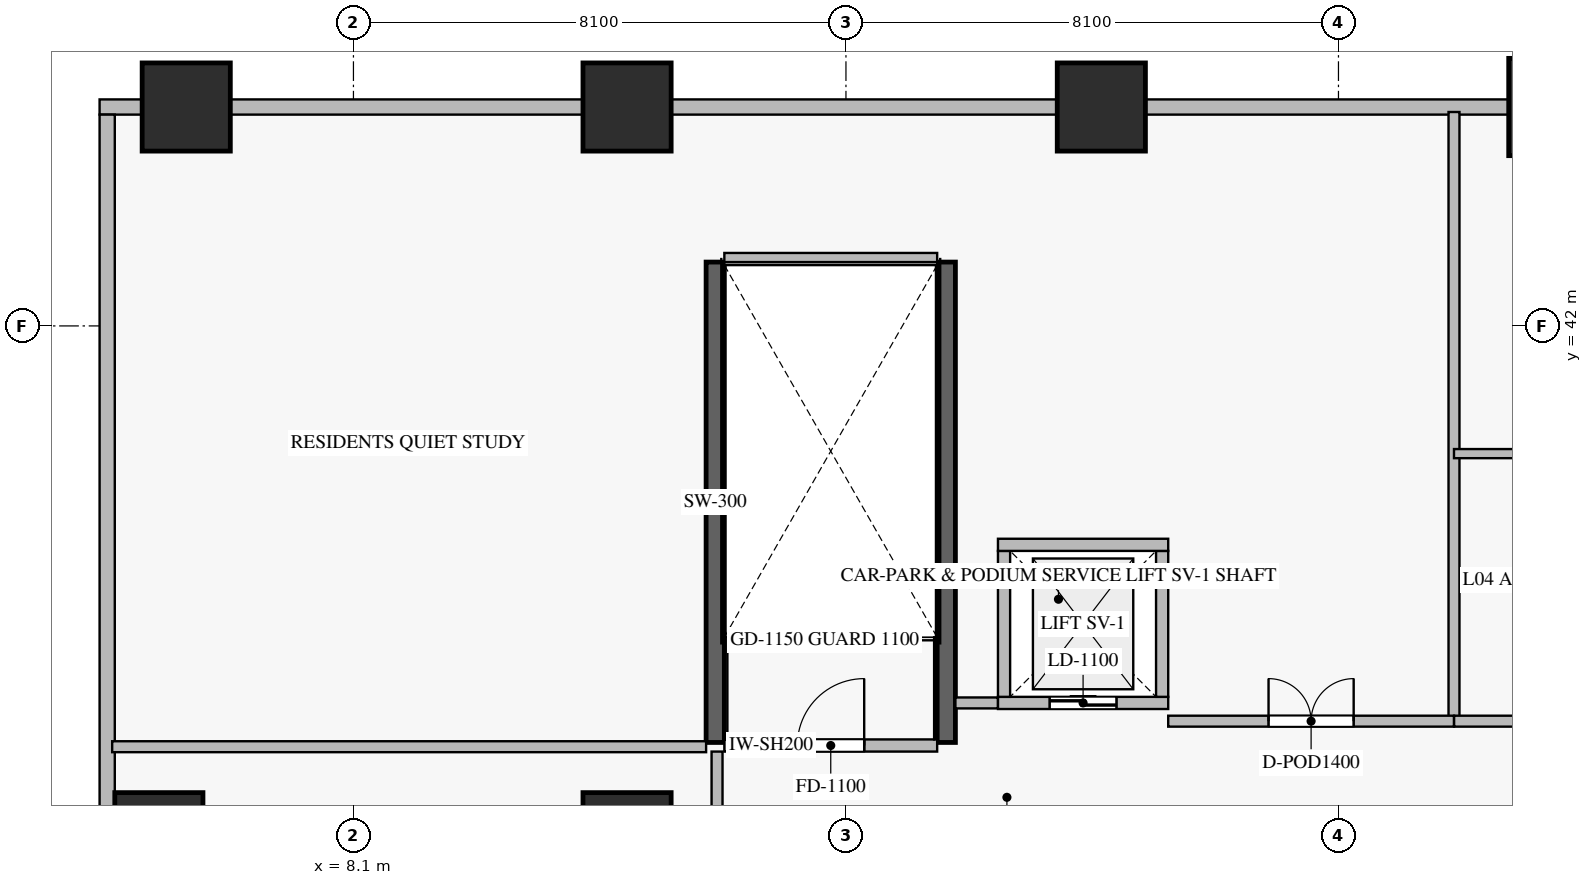
"""IFC4 building model, lengths in metres.
Left out: names, types, materials, properties, quantities, classifications, styles, units other than length and angle.
Written with IfcOpenShell. Run it as: python <this file> out.ifc"""

import sys

from ifc_helpers import new_model, si_unit, direction, frame, frame_2d, origin, origin_2d, place, context, subcontext, project, spatial, rectangle, extrude, source, transform, mapped, element, fill, save


model = new_model("IFC4")
c1 = context("Model", 3, precision=1e-05, world=origin(), true_north=direction((0.0, 1.0)))
c2 = subcontext(c1, "Body", "Model", "MODEL_VIEW")
j1 = project(units=[si_unit("LENGTHUNIT", "METRE"), si_unit("PLANEANGLEUNIT", "RADIAN")], contexts=[c1])
p1 = place(None, origin())
s1 = spatial("IfcSite", under=j1, at=p1, CompositionType="ELEMENT")
p2 = place(p1, origin())
s2 = spatial("IfcBuilding", under=s1, at=p2, CompositionType="ELEMENT")
p3 = place(p2, frame((0.0, 0.0, 21.0)))
s3 = spatial("IfcBuildingStorey", under=s2, at=p3, CompositionType="ELEMENT", Elevation=21.0)
m1 = source(origin(), c2, "Body", "SweptSolid", [
    extrude(rectangle(XDim=1.45, YDim=1.45, at=origin_2d()), origin(), (0.0, 0.0, 1.0), 6.11),
])
for number, where, z_axis, x_axis in (
    (1, (12.6, 45.6, -0.85), (0.0, 0.0, 1.0), (1.0, 0.0, 0.0)),
    (2, (20.4, 45.6, -0.85), (0.0, 0.0, 1.0), (1.0, 0.0, 0.0)),
):
    element("IfcColumn", number, at=place(p3, frame(where, z_axis=z_axis, x_axis=x_axis)), inside=s3, PredefinedType="COLUMN", context=c2, shape_type="MappedRepresentation", body=[
        mapped(m1, transform((0.0, 0.0, 0.0), scale=1.0)),
    ])
m2 = source(origin(), c2, "Body", "SweptSolid", [
    extrude(rectangle(XDim=1.6, YDim=1.6, at=origin_2d()), origin(), (0.0, 0.0, 1.0), 6.11),
])
p4 = place(p3, frame((27.9, 45.6, -0.85), z_axis=(0.0, 0.0, 1.0), x_axis=(1.0, 0.0, 0.0)))
e3 = element("IfcColumn", 3, at=p4, inside=s3, PredefinedType="COLUMN", context=c2, shape_type="MappedRepresentation", body=[
    mapped(m2, transform((0.0, 0.0, 0.0), scale=1.0)),
])
for number, where, z_axis, x_axis in (
    (4, (12.6, 33.6, -0.85), (0.0, 0.0, 1.0), (1.0, 0.0, 0.0)),
    (5, (4.9, 33.6, -0.85), (0.0, 0.0, 1.0), (1.0, 0.0, 0.0)),
    (6, (5.35, 45.6, -0.85), (0.0, 0.0, 1.0), (1.0, 0.0, 0.0)),
):
    element("IfcColumn", number, at=place(p3, frame(where, z_axis=z_axis, x_axis=x_axis)), inside=s3, PredefinedType="COLUMN", context=c2, shape_type="MappedRepresentation", body=[
        mapped(m1, transform((0.0, 0.0, 0.0), scale=1.0)),
    ])
p5 = place(p3, frame((60.875, 45.6, 0.0), z_axis=(0.0, 0.0, 1.0), x_axis=(-1.0, 0.0, 0.0)))
e7 = element("IfcWall", 7, at=p5, inside=s3, PredefinedType="ELEMENTEDWALL", context=c2, shape_type="SweptSolid", body=[
    extrude(rectangle(XDim=56.95, YDim=0.25, at=frame_2d((28.475, 0.0))), origin(), (0.0, 0.0, 1.0), 2.845),
])
p6 = place(p3, frame((4.05, 45.475, 0.0), z_axis=(0.0, 0.0, 1.0), x_axis=(0.0, -1.0, 0.0)))
e8 = element("IfcWall", 8, at=p6, inside=s3, PredefinedType="ELEMENTEDWALL", context=c2, shape_type="SweptSolid", body=[
    extrude(rectangle(XDim=40.55, YDim=0.25, at=frame_2d((20.275, 0.0))), origin(), (0.0, 0.0, 1.0), 5.245),
])
p7 = place(p6, frame((14.497, 0.0, 0.6)))
e9 = element("IfcOpeningElement", 9, at=p7, cuts=e8, PredefinedType="OPENING", context=c2, shape_type="SweptSolid", body=[
    extrude(rectangle(XDim=2.4, YDim=2.6, at=frame_2d((1.2, 1.3))), frame((0.0, 0.135, 0.0), z_axis=(0.0, -1.0, 0.0), x_axis=(1.0, 0.0, 0.0)), (0.0, 0.0, 1.0), 0.27),
])
p8 = place(p6, frame((23.653, 0.0, 0.6)))
e10 = element("IfcOpeningElement", 10, at=p8, cuts=e8, PredefinedType="OPENING", context=c2, shape_type="SweptSolid", body=[
    extrude(rectangle(XDim=2.4, YDim=2.6, at=frame_2d((1.2, 1.3))), frame((0.0, 0.135, 0.0), z_axis=(0.0, -1.0, 0.0), x_axis=(1.0, 0.0, 0.0)), (0.0, 0.0, 1.0), 0.27),
])
for number, where, z_axis, x_axis in (
    (11, (14.05, 35.15, -0.85), (0.0, 0.0, 1.0), (0.0, 1.0, 0.0)),
    (12, (17.85, 35.15, -0.85), (0.0, 0.0, 1.0), (0.0, 1.0, 0.0)),
):
    element("IfcWall", number, at=place(p3, frame(where, z_axis=z_axis, x_axis=x_axis)), inside=s3, PredefinedType="SHEAR", context=c2, shape_type="SweptSolid", body=[
        extrude(rectangle(XDim=7.9, YDim=0.3, at=frame_2d((3.95, 0.0))), origin(), (0.0, 0.0, 1.0), 6.108),
    ])
p9 = place(p3, frame((14.2, 35.1, 0.0), z_axis=(0.0, 0.0, 1.0), x_axis=(1.0, 0.0, 0.0)))
e13 = element("IfcWall", 13, at=p9, inside=s3, PredefinedType="STANDARD", context=c2, shape_type="SweptSolid", body=[
    extrude(rectangle(XDim=3.5, YDim=0.2, at=frame_2d((1.75, 0.0))), origin(), (0.0, 0.0, 1.0), 5.26),
])
p10 = place(p9, frame((1.2, 0.0, 0.0)))
e14 = element("IfcOpeningElement", 14, at=p10, cuts=e13, PredefinedType="OPENING", context=c2, shape_type="SweptSolid", body=[
    extrude(rectangle(XDim=1.1, YDim=2.15, at=frame_2d((0.55, 1.075))), frame((0.0, 0.11, 0.0), z_axis=(0.0, -1.0, 0.0), x_axis=(1.0, 0.0, 0.0)), (0.0, 0.0, 1.0), 0.22),
])
p11 = place(p3, frame((14.2, 43.1, 0.0), z_axis=(0.0, 0.0, 1.0), x_axis=(1.0, 0.0, 0.0)))
e15 = element("IfcWall", 15, at=p11, inside=s3, PredefinedType="STANDARD", context=c2, shape_type="SweptSolid", body=[
    extrude(rectangle(XDim=3.5, YDim=0.2, at=frame_2d((1.75, 0.0))), origin(), (0.0, 0.0, 1.0), 5.26),
])
p12 = place(p3, frame((18.7, 35.8, 0.0), z_axis=(0.0, 0.0, 1.0), x_axis=(1.0, 0.0, 0.0)))
e16 = element("IfcWall", 16, at=p12, inside=s3, PredefinedType="STANDARD", context=c2, shape_type="SweptSolid", body=[
    extrude(rectangle(XDim=2.8, YDim=0.2, at=frame_2d((1.4, 0.0))), origin(), (0.0, 0.0, 1.0), 5.26),
])
p13 = place(p12, frame((0.85, 0.0, 0.0)))
e17 = element("IfcOpeningElement", 17, at=p13, cuts=e16, PredefinedType="OPENING", context=c2, shape_type="SweptSolid", body=[
    extrude(rectangle(XDim=1.1, YDim=2.2, at=frame_2d((0.55, 1.1))), frame((0.0, 0.11, 0.0), z_axis=(0.0, -1.0, 0.0), x_axis=(1.0, 0.0, 0.0)), (0.0, 0.0, 1.0), 0.22),
])
for number, where, z_axis, x_axis in (
    (18, (18.8, 35.9, 0.0), (0.0, 0.0, 1.0), (0.0, 1.0, 0.0)),
    (19, (21.4, 35.9, 0.0), (0.0, 0.0, 1.0), (0.0, 1.0, 0.0)),
):
    element("IfcWall", number, at=place(p3, frame(where, z_axis=z_axis, x_axis=x_axis)), inside=s3, PredefinedType="STANDARD", context=c2, shape_type="SweptSolid", body=[
        extrude(rectangle(XDim=2.4, YDim=0.2, at=frame_2d((1.2, 0.0))), origin(), (0.0, 0.0, 1.0), 5.26),
    ])
p14 = place(p3, frame((18.7, 38.4, 0.0), z_axis=(0.0, 0.0, 1.0), x_axis=(1.0, 0.0, 0.0)))
e20 = element("IfcWall", 20, at=p14, inside=s3, PredefinedType="STANDARD", context=c2, shape_type="SweptSolid", body=[
    extrude(rectangle(XDim=2.8, YDim=0.2, at=frame_2d((1.4, 0.0))), origin(), (0.0, 0.0, 1.0), 5.26),
])
p15 = place(p3, frame((4.132, 35.08, 0.0), z_axis=(0.0, 0.0, 1.0), x_axis=(1.0, 0.0, 0.0)))
e21 = element("IfcWall", 21, at=p15, inside=s3, PredefinedType="PARTITIONING", context=c2, shape_type="SweptSolid", body=[
    extrude(rectangle(XDim=9.768, YDim=0.18, at=frame_2d((4.884, 0.0))), origin(), (0.0, 0.0, 1.0), 5.26),
])
p16 = place(p3, frame((18.0, 35.8, 0.0), z_axis=(0.0, 0.0, 1.0), x_axis=(1.0, 0.0, 0.0)))
e22 = element("IfcWall", 22, at=p16, inside=s3, PredefinedType="PARTITIONING", context=c2, shape_type="SweptSolid", body=[
    extrude(rectangle(XDim=0.698, YDim=0.18, at=frame_2d((0.349, 0.0))), origin(), (0.0, 0.0, 1.0), 5.26),
])
p17 = place(p3, frame((14.08, 33.08, 0.0), z_axis=(0.0, 0.0, 1.0), x_axis=(0.0, 1.0, 0.0)))
e23 = element("IfcWall", 23, at=p17, inside=s3, PredefinedType="PARTITIONING", context=c2, shape_type="SweptSolid", body=[
    extrude(rectangle(XDim=1.92, YDim=0.18, at=frame_2d((0.96, 0.0))), origin(), (0.0, 0.0, 1.0), 5.26),
])
p18 = place(p3, frame((26.2, 35.5, 0.0), z_axis=(0.0, 0.0, 1.0), x_axis=(0.0, 1.0, 0.0)))
e24 = element("IfcWall", 24, at=p18, inside=s3, PredefinedType="PARTITIONING", context=c2, shape_type="SweptSolid", body=[
    extrude(rectangle(XDim=10.018, YDim=0.18, at=frame_2d((5.009, 0.0))), origin(), (0.0, 0.0, 1.0), 5.26),
])
p19 = place(p3, frame((21.5, 35.5, 0.0), z_axis=(0.0, 0.0, 1.0), x_axis=(1.0, 0.0, 0.0)))
e25 = element("IfcWall", 25, at=p19, inside=s3, PredefinedType="PARTITIONING", context=c2, shape_type="SweptSolid", body=[
    extrude(rectangle(XDim=4.7, YDim=0.18, at=frame_2d((2.35, 0.0))), origin(), (0.0, 0.0, 1.0), 5.26),
])
p20 = place(p19, frame((1.65, 0.0, 0.0)))
e26 = element("IfcOpeningElement", 26, at=p20, cuts=e25, PredefinedType="OPENING", context=c2, shape_type="SweptSolid", body=[
    extrude(rectangle(XDim=1.4, YDim=2.25, at=frame_2d((0.7, 1.125))), frame((0.0, 0.1, 0.0), z_axis=(0.0, -1.0, 0.0), x_axis=(1.0, 0.0, 0.0)), (0.0, 0.0, 1.0), 0.2),
])
p21 = place(p3, frame((26.202, 35.5, 0.0), z_axis=(0.0, 0.0, 1.0), x_axis=(1.0, 0.0, 0.0)))
e27 = element("IfcWall", 27, at=p21, inside=s3, PredefinedType="PARTITIONING", context=c2, shape_type="SweptSolid", body=[
    extrude(rectangle(XDim=3.598, YDim=0.18, at=frame_2d((1.799, 0.0))), origin(), (0.0, 0.0, 1.0), 5.26),
])
p22 = place(p21, frame((1.299, 0.0, 0.0)))
e28 = element("IfcOpeningElement", 28, at=p22, cuts=e27, PredefinedType="OPENING", context=c2, shape_type="SweptSolid", body=[
    extrude(rectangle(XDim=1.0, YDim=2.15, at=frame_2d((0.5, 1.075))), frame((0.0, 0.1, 0.0), z_axis=(0.0, -1.0, 0.0), x_axis=(1.0, 0.0, 0.0)), (0.0, 0.0, 1.0), 0.2),
])
p23 = place(p3, frame((26.2, 39.9, 0.0), z_axis=(0.0, 0.0, 1.0), x_axis=(1.0, 0.0, 0.0)))
e29 = element("IfcWall", 29, at=p23, inside=s3, PredefinedType="PARTITIONING", context=c2, shape_type="SweptSolid", body=[
    extrude(rectangle(XDim=12.4, YDim=0.15, at=frame_2d((6.2, 0.0))), origin(), (0.0, 0.0, 1.0), 5.26),
])
p24 = place(p23, frame((2.07, 0.0, 0.0)))
e30 = element("IfcOpeningElement", 30, at=p24, cuts=e29, PredefinedType="OPENING", context=c2, shape_type="SweptSolid", body=[
    extrude(rectangle(XDim=0.9, YDim=2.1, at=frame_2d((0.45, 1.05))), frame((0.0, 0.085, 0.0), z_axis=(0.0, -1.0, 0.0), x_axis=(1.0, 0.0, 0.0)), (0.0, 0.0, 1.0), 0.17),
])
m3 = source(origin(), c2, "Body", "SweptSolid", [
    extrude(rectangle(XDim=1.1, YDim=2.15, at=frame_2d((0.55, 1.075))), frame((0.0, 0.025, 0.0), z_axis=(0.0, -1.0, 0.0), x_axis=(1.0, 0.0, 0.0)), (0.0, 0.0, 1.0), 0.05),
])
p25 = place(p10, origin())
e31 = element("IfcDoor", 31, at=p25, inside=s3, OperationType="SINGLE_SWING_RIGHT", PredefinedType="DOOR", context=c2, shape_type="MappedRepresentation", body=[
    mapped(m3, transform((0.0, 0.0, 0.0), scale=1.0)),
])
fill(e14, e31)
m4 = source(origin(), c2, "Body", "SweptSolid", [
    extrude(rectangle(XDim=1.1, YDim=2.2, at=frame_2d((0.55, 1.1))), frame((0.0, 0.025, 0.0), z_axis=(0.0, -1.0, 0.0), x_axis=(1.0, 0.0, 0.0)), (0.0, 0.0, 1.0), 0.05),
])
p26 = place(p13, origin())
e32 = element("IfcDoor", 32, at=p26, inside=s3, OperationType="DOUBLE_DOOR_SLIDING", PredefinedType="DOOR", context=c2, shape_type="MappedRepresentation", body=[
    mapped(m4, transform((0.0, 0.0, 0.0), scale=1.0)),
])
fill(e17, e32)
m5 = source(origin(), c2, "Body", "SweptSolid", [
    extrude(rectangle(XDim=1.4, YDim=2.25, at=frame_2d((0.7, 1.125))), frame((0.0, 0.025, 0.0), z_axis=(0.0, -1.0, 0.0), x_axis=(1.0, 0.0, 0.0)), (0.0, 0.0, 1.0), 0.05),
])
p27 = place(p20, origin())
e33 = element("IfcDoor", 33, at=p27, inside=s3, OperationType="DOUBLE_DOOR_SINGLE_SWING", PredefinedType="DOOR", context=c2, shape_type="MappedRepresentation", body=[
    mapped(m5, transform((0.0, 0.0, 0.0), scale=1.0)),
])
fill(e26, e33)
save(model, sys.argv[1])
